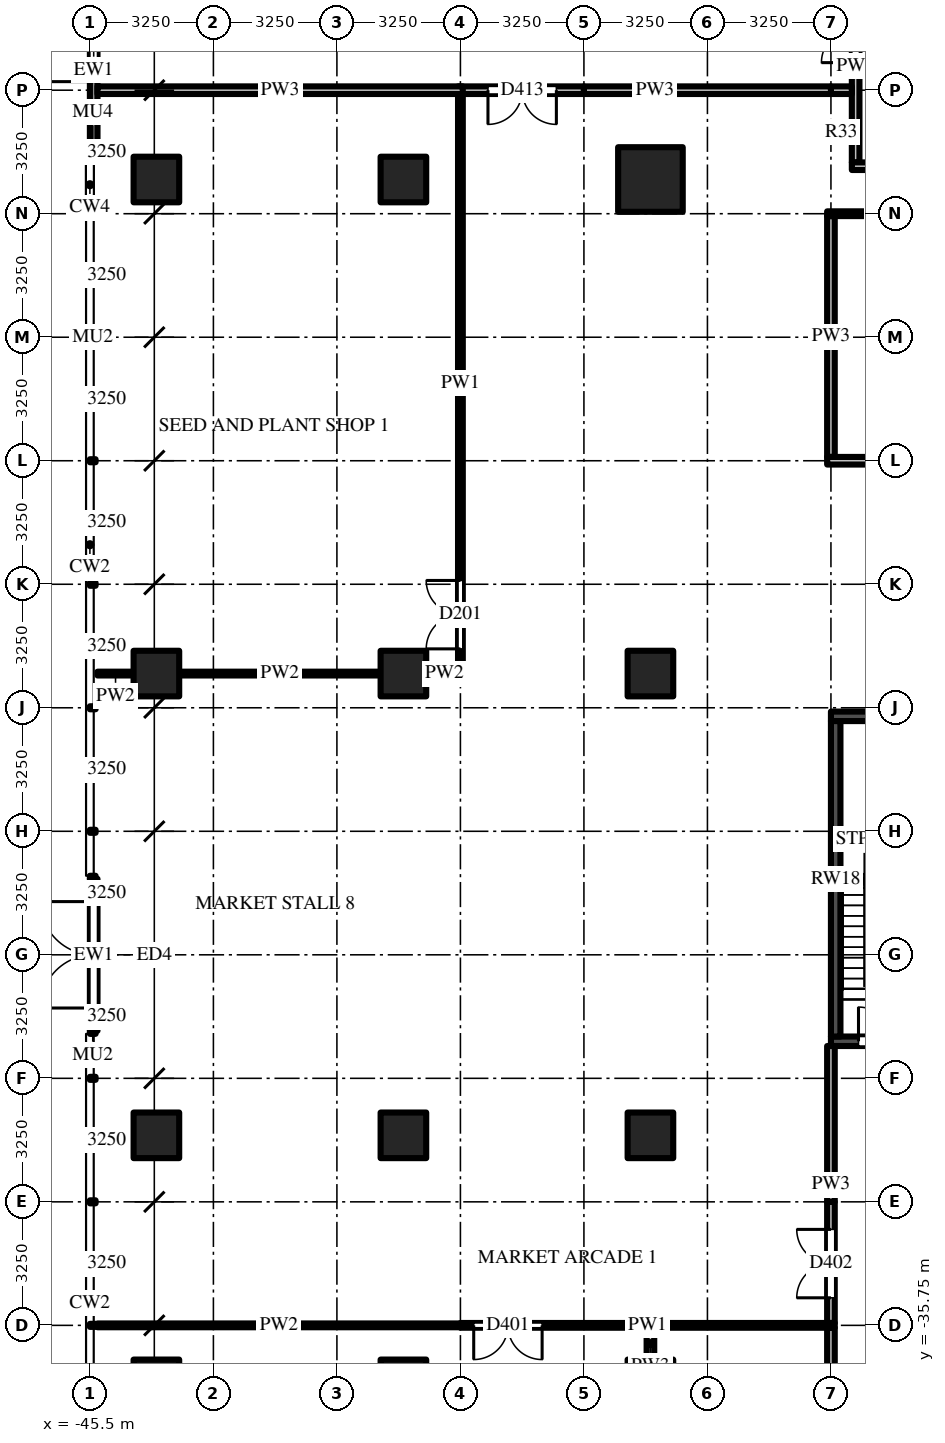
"""IFC4 building model, lengths in metres.
Left out: names, types, materials, properties, quantities, classifications, styles, units other than length and angle.
Written with IfcOpenShell. Run it as: python <this file> out.ifc"""

import sys

from ifc_helpers import new_model, si_unit, direction, frame, frame_2d, origin, origin_2d, place, context, subcontext, project, spatial, rectangle, extrude, source, transform, mapped, element, fill, save


model = new_model("IFC4")
c1 = context("Model", 3, precision=1e-05, world=origin(), true_north=direction((0.0, 1.0)))
c2 = subcontext(c1, "Body", "Model", "MODEL_VIEW")
j1 = project(units=[si_unit("LENGTHUNIT", "METRE"), si_unit("PLANEANGLEUNIT", "RADIAN")], contexts=[c1])
p1 = place(None, origin())
s1 = spatial("IfcSite", under=j1, at=p1, CompositionType="ELEMENT")
p2 = place(p1, origin())
s2 = spatial("IfcBuilding", under=s1, at=p2, CompositionType="ELEMENT")
p3 = place(p2, origin())
s3 = spatial("IfcBuildingStorey", under=s2, at=p3, CompositionType="ELEMENT", Elevation=0.0)
m1 = source(origin(), c2, "Body", "SweptSolid", [
    extrude(rectangle(XDim=1.7, YDim=1.7, at=origin_2d()), origin(), (0.0, 0.0, 1.0), 8.5),
])
p4 = place(p3, frame((-30.75, -5.6, -0.5), z_axis=(0.0, 0.0, 1.0), x_axis=(1.0, 0.0, 0.0)))
e1 = element("IfcColumn", 1, at=p4, inside=s3, PredefinedType="COLUMN", context=c2, shape_type="MappedRepresentation", body=[
    mapped(m1, transform((0.0, 0.0, 0.0))),
])
m2 = source(origin(), c2, "Body", "SweptSolid", [
    extrude(rectangle(XDim=1.2, YDim=1.2, at=origin_2d()), origin(), (0.0, 0.0, 1.0), 8.5),
])
for number, where, z_axis, x_axis in (
    (2, (-30.75, -18.6, -0.5), (0.0, 0.0, 1.0), (1.0, 0.0, 0.0)),
    (3, (-30.75, -30.75, -0.5), (0.0, 0.0, 1.0), (1.0, 0.0, 0.0)),
    (4, (-30.75, -37.25, -0.5), (0.0, 0.0, 1.0), (1.0, 0.0, 0.0)),
    (5, (-37.25, -5.6, -0.5), (0.0, 0.0, 1.0), (1.0, 0.0, 0.0)),
    (6, (-37.25, -18.6, -0.5), (0.0, 0.0, 1.0), (1.0, 0.0, 0.0)),
    (7, (-37.25, -30.75, -0.5), (0.0, 0.0, 1.0), (1.0, 0.0, 0.0)),
    (8, (-37.25, -37.25, -0.5), (0.0, 0.0, 1.0), (1.0, 0.0, 0.0)),
    (9, (-43.75, -5.6, -0.5), (0.0, 0.0, 1.0), (1.0, 0.0, 0.0)),
    (10, (-43.75, -18.6, -0.5), (0.0, 0.0, 1.0), (1.0, 0.0, 0.0)),
    (11, (-43.75, -30.75, -0.5), (0.0, 0.0, 1.0), (1.0, 0.0, 0.0)),
    (12, (-43.75, -37.25, -0.5), (0.0, 0.0, 1.0), (1.0, 0.0, 0.0)),
):
    element("IfcColumn", number, at=place(p3, frame(where, z_axis=z_axis, x_axis=x_axis)), inside=s3, PredefinedType="COLUMN", context=c2, shape_type="MappedRepresentation", body=[
        mapped(m2, transform((0.0, 0.0, 0.0))),
    ])
m3 = source(origin(), c2, "Body", "SweptSolid", [
    extrude(rectangle(XDim=6.5, YDim=0.25, at=frame_2d((3.25, 0.0))), origin(), (0.0, 0.0, 1.0), 7.7),
])
p5 = place(p3, frame((-26.0, -28.275, 0.0), z_axis=(0.0, 0.0, 1.0), x_axis=(1.0, 0.0, 0.0)))
e13 = element("IfcWall", 13, at=p5, inside=s3, PredefinedType="SHEAR", context=c2, shape_type="MappedRepresentation", body=[
    mapped(m3, transform((0.0, 0.0, 0.0))),
])
m4 = source(origin(), c2, "Body", "SweptSolid", [
    extrude(rectangle(XDim=1.8, YDim=2.1, at=frame_2d((0.9, 1.05))), frame((0.0, 0.135, 0.0), z_axis=(0.0, -1.0, 0.0), x_axis=(1.0, 0.0, 0.0)), (0.0, 0.0, 1.0), 0.27),
])
p6 = place(p5, frame((0.725, 0.0, 0.0)))
e14 = element("IfcOpeningElement", 14, at=p6, cuts=e13, PredefinedType="OPENING", context=c2, shape_type="MappedRepresentation", body=[
    mapped(m4, transform((0.0, 0.0, 0.0))),
])
p7 = place(p5, frame((3.975, 0.0, 0.0)))
e15 = element("IfcOpeningElement", 15, at=p7, cuts=e13, PredefinedType="OPENING", context=c2, shape_type="MappedRepresentation", body=[
    mapped(m4, transform((0.0, 0.0, 0.0))),
])
p8 = place(p3, frame((-26.0, -19.725, 0.0), z_axis=(0.0, 0.0, 1.0), x_axis=(1.0, 0.0, 0.0)))
e16 = element("IfcWall", 16, at=p8, inside=s3, PredefinedType="SHEAR", context=c2, shape_type="MappedRepresentation", body=[
    mapped(m3, transform((0.0, 0.0, 0.0))),
])
m5 = source(origin(), c2, "Body", "SweptSolid", [
    extrude(rectangle(XDim=8.3, YDim=0.25, at=frame_2d((4.15, 0.0))), origin(), (0.0, 0.0, 1.0), 7.7),
])
p9 = place(p3, frame((-25.875, -28.15, 0.0), z_axis=(0.0, 0.0, 1.0), x_axis=(0.0, 1.0, 0.0)))
e17 = element("IfcWall", 17, at=p9, inside=s3, PredefinedType="SHEAR", context=c2, shape_type="MappedRepresentation", body=[
    mapped(m5, transform((0.0, 0.0, 0.0))),
])
m6 = source(origin(), c2, "Body", "SweptSolid", [
    extrude(rectangle(XDim=6.5, YDim=0.2, at=frame_2d((3.25, 0.0))), origin(), (0.0, 0.0, 1.0), 7.7),
])
p10 = place(p3, frame((-45.4, -4.875, 0.0), z_axis=(0.0, 0.0, 1.0), x_axis=(0.0, 1.0, 0.0)))
e18 = element("IfcWall", 18, at=p10, inside=s3, PredefinedType="SOLIDWALL", context=c2, shape_type="MappedRepresentation", body=[
    mapped(m6, transform((0.0, 0.0, 0.0))),
])
m7 = source(origin(), c2, "Body", "SweptSolid", [
    extrude(rectangle(XDim=2.8, YDim=2.6, at=frame_2d((1.4, 1.3))), frame((0.0, 0.11, 0.0), z_axis=(0.0, -1.0, 0.0), x_axis=(1.0, 0.0, 0.0)), (0.0, 0.0, 1.0), 0.22),
])
p11 = place(p10, frame((1.85, 0.0, 0.0)))
e19 = element("IfcOpeningElement", 19, at=p11, cuts=e18, PredefinedType="OPENING", context=c2, shape_type="MappedRepresentation", body=[
    mapped(m7, transform((0.0, 0.0, 0.0))),
])
m8 = source(origin(), c2, "Body", "SweptSolid", [
    extrude(rectangle(XDim=4.0, YDim=0.2, at=frame_2d((2.0, 0.0))), origin(), (0.0, 0.0, 1.0), 7.7),
])
p12 = place(p3, frame((-45.4, -28.0, 0.0), z_axis=(0.0, 0.0, 1.0), x_axis=(0.0, 1.0, 0.0)))
e20 = element("IfcWall", 20, at=p12, inside=s3, PredefinedType="SOLIDWALL", context=c2, shape_type="MappedRepresentation", body=[
    mapped(m8, transform((0.0, 0.0, 0.0))),
])
m9 = source(origin(), c2, "Body", "SweptSolid", [
    extrude(rectangle(XDim=2.8, YDim=2.4, at=frame_2d((1.4, 1.2))), frame((0.0, 0.11, 0.0), z_axis=(0.0, -1.0, 0.0), x_axis=(1.0, 0.0, 0.0)), (0.0, 0.0, 1.0), 0.22),
])
p13 = place(p12, frame((0.6, 0.0, 0.0)))
e21 = element("IfcOpeningElement", 21, at=p13, cuts=e20, PredefinedType="OPENING", context=c2, shape_type="MappedRepresentation", body=[
    mapped(m9, transform((0.0, 0.0, 0.0))),
])
p14 = place(p3, frame((-35.75, -18.55, 0.0), z_axis=(0.0, 0.0, 1.0), x_axis=(0.0, 1.0, 0.0)))
e22 = element("IfcWall", 22, at=p14, inside=s3, PredefinedType="PARTITIONING", context=c2, shape_type="SweptSolid", body=[
    extrude(rectangle(XDim=15.2, YDim=0.125, at=frame_2d((7.6, 0.0))), origin(), (0.0, 0.0, 1.0), 6.997),
])
m10 = source(origin(), c2, "Body", "SweptSolid", [
    extrude(rectangle(XDim=1.8, YDim=2.1, at=frame_2d((0.9, 1.05))), frame((0.0, 0.073, 0.0), z_axis=(0.0, -1.0, 0.0), x_axis=(1.0, 0.0, 0.0)), (0.0, 0.0, 1.0), 0.145),
])
p15 = place(p14, frame((0.6, 0.0, 0.0)))
e23 = element("IfcOpeningElement", 23, at=p15, cuts=e22, PredefinedType="OPENING", context=c2, shape_type="MappedRepresentation", body=[
    mapped(m10, transform((0.0, 0.0, 0.0))),
])
p16 = place(p3, frame((-30.75, -36.65, 0.0), z_axis=(0.0, 0.0, 1.0), x_axis=(0.0, 1.0, 0.0)))
e24 = element("IfcWall", 24, at=p16, inside=s3, PredefinedType="PARTITIONING", context=c2, shape_type="SweptSolid", body=[
    extrude(rectangle(XDim=0.837, YDim=0.2, at=frame_2d((0.419, 0.0))), origin(), (0.0, 0.0, 1.0), 6.997),
])
m11 = source(origin(), c2, "Body", "SweptSolid", [
    extrude(rectangle(XDim=3.188, YDim=0.2, at=frame_2d((1.594, 0.0))), origin(), (0.0, 0.0, 1.0), 6.997),
])
p17 = place(p3, frame((-26.0, -35.688, 0.0), z_axis=(0.0, 0.0, 1.0), x_axis=(0.0, 1.0, 0.0)))
e25 = element("IfcWall", 25, at=p17, inside=s3, PredefinedType="PARTITIONING", context=c2, shape_type="MappedRepresentation", body=[
    mapped(m11, transform((0.0, 0.0, 0.0))),
])
m12 = source(origin(), c2, "Body", "SweptSolid", [
    extrude(rectangle(XDim=1.8, YDim=2.1, at=frame_2d((0.9, 1.05))), frame((0.0, 0.11, 0.0), z_axis=(0.0, -1.0, 0.0), x_axis=(1.0, 0.0, 0.0)), (0.0, 0.0, 1.0), 0.22),
])
p18 = place(p17, frame((0.663, 0.0, 0.0)))
e26 = element("IfcOpeningElement", 26, at=p18, cuts=e25, PredefinedType="OPENING", context=c2, shape_type="MappedRepresentation", body=[
    mapped(m12, transform((0.0, 0.0, 0.0))),
])
p19 = place(p3, frame((-26.0, -12.9, 0.0), z_axis=(0.0, 0.0, 1.0), x_axis=(0.0, 1.0, 0.0)))
e27 = element("IfcWall", 27, at=p19, inside=s3, PredefinedType="PARTITIONING", context=c2, shape_type="SweptSolid", body=[
    extrude(rectangle(XDim=6.337, YDim=0.2, at=frame_2d((3.169, 0.0))), origin(), (0.0, 0.0, 1.0), 7.7),
])
m13 = source(origin(), c2, "Body", "SweptSolid", [
    extrude(rectangle(XDim=4.1, YDim=0.2, at=frame_2d((2.05, 0.0))), origin(), (0.0, 0.0, 1.0), 6.839),
])
p20 = place(p3, frame((-26.0, -28.4, 0.0), z_axis=(0.0, 0.0, 1.0), x_axis=(0.0, -1.0, 0.0)))
e28 = element("IfcWall", 28, at=p20, inside=s3, PredefinedType="PARTITIONING", context=c2, shape_type="MappedRepresentation", body=[
    mapped(m13, transform((0.0, 0.0, 0.0))),
])
m14 = source(origin(), c2, "Body", "SweptSolid", [
    extrude(rectangle(XDim=9.488, YDim=0.2, at=frame_2d((4.744, 0.0))), origin(), (0.0, 0.0, 1.0), 6.839),
])
p21 = place(p3, frame((-26.0, -45.3, 0.0), z_axis=(0.0, 0.0, 1.0), x_axis=(0.0, 1.0, 0.0)))
e29 = element("IfcWall", 29, at=p21, inside=s3, PredefinedType="PARTITIONING", context=c2, shape_type="MappedRepresentation", body=[
    mapped(m14, transform((0.0, 0.0, 0.0))),
])
m15 = source(origin(), c2, "Body", "SweptSolid", [
    extrude(rectangle(XDim=1.0, YDim=2.1, at=frame_2d((0.5, 1.05))), frame((0.0, 0.11, 0.0), z_axis=(0.0, -1.0, 0.0), x_axis=(1.0, 0.0, 0.0)), (0.0, 0.0, 1.0), 0.22),
])
p22 = place(p21, frame((0.15, 0.0, 0.0)))
e30 = element("IfcOpeningElement", 30, at=p22, cuts=e29, PredefinedType="OPENING", context=c2, shape_type="MappedRepresentation", body=[
    mapped(m15, transform((0.0, 0.0, 0.0))),
])
m16 = source(origin(), c2, "Body", "SweptSolid", [
    extrude(rectangle(XDim=5.05, YDim=0.2, at=frame_2d((2.525, 0.0))), origin(), (0.0, 0.0, 1.0), 7.077),
])
p23 = place(p3, frame((-25.35, -5.15, 0.0), z_axis=(0.0, 0.0, 1.0), x_axis=(0.0, 1.0, 0.0)))
e31 = element("IfcWall", 31, at=p23, inside=s3, PredefinedType="PARTITIONING", context=c2, shape_type="MappedRepresentation", body=[
    mapped(m16, transform((0.0, 0.0, 0.0))),
])
p24 = place(p23, frame((2.625, 0.0, 0.0)))
e32 = element("IfcOpeningElement", 32, at=p24, cuts=e31, PredefinedType="OPENING", context=c2, shape_type="MappedRepresentation", body=[
    mapped(m12, transform((0.0, 0.0, 0.0))),
])
p25 = place(p3, frame((-45.3, -35.75, 0.0), z_axis=(0.0, 0.0, 1.0), x_axis=(1.0, 0.0, 0.0)))
e33 = element("IfcWall", 33, at=p25, inside=s3, PredefinedType="PARTITIONING", context=c2, shape_type="SweptSolid", body=[
    extrude(rectangle(XDim=9.55, YDim=0.1, at=frame_2d((4.775, 0.0))), origin(), (0.0, 0.0, 1.0), 6.997),
])
m17 = source(origin(), c2, "Body", "SweptSolid", [
    extrude(rectangle(XDim=9.85, YDim=0.125, at=frame_2d((4.925, 0.0))), origin(), (0.0, 0.0, 1.0), 6.997),
])
p26 = place(p3, frame((-25.9, -35.75, 0.0), z_axis=(0.0, 0.0, 1.0), x_axis=(-1.0, 0.0, 0.0)))
e34 = element("IfcWall", 34, at=p26, inside=s3, PredefinedType="PARTITIONING", context=c2, shape_type="MappedRepresentation", body=[
    mapped(m17, transform((0.0, 0.0, 0.0))),
])
p27 = place(p26, frame((7.7, 0.0, 0.0)))
e35 = element("IfcOpeningElement", 35, at=p27, cuts=e34, PredefinedType="OPENING", context=c2, shape_type="MappedRepresentation", body=[
    mapped(m10, transform((0.0, 0.0, 0.0))),
])
m18 = source(origin(), c2, "Body", "SweptSolid", [
    extrude(rectangle(XDim=0.95, YDim=0.1, at=frame_2d((0.475, 0.0))), origin(), (0.0, 0.0, 1.0), 7.7),
])
p28 = place(p3, frame((-45.3, -18.6, 0.0), z_axis=(0.0, 0.0, 1.0), x_axis=(1.0, 0.0, 0.0)))
e36 = element("IfcWall", 36, at=p28, inside=s3, PredefinedType="PARTITIONING", context=c2, shape_type="MappedRepresentation", body=[
    mapped(m18, transform((0.0, 0.0, 0.0))),
])
m19 = source(origin(), c2, "Body", "SweptSolid", [
    extrude(rectangle(XDim=5.3, YDim=0.1, at=frame_2d((2.65, 0.0))), origin(), (0.0, 0.0, 1.0), 6.997),
])
p29 = place(p3, frame((-43.15, -18.6, 0.0), z_axis=(0.0, 0.0, 1.0), x_axis=(1.0, 0.0, 0.0)))
e37 = element("IfcWall", 37, at=p29, inside=s3, PredefinedType="PARTITIONING", context=c2, shape_type="MappedRepresentation", body=[
    mapped(m19, transform((0.0, 0.0, 0.0))),
])
m20 = source(origin(), c2, "Body", "SweptSolid", [
    extrude(rectangle(XDim=0.962, YDim=0.1, at=frame_2d((0.481, 0.0))), origin(), (0.0, 0.0, 1.0), 6.997),
])
p30 = place(p3, frame((-36.65, -18.6, 0.0), z_axis=(0.0, 0.0, 1.0), x_axis=(1.0, 0.0, 0.0)))
e38 = element("IfcWall", 38, at=p30, inside=s3, PredefinedType="PARTITIONING", context=c2, shape_type="MappedRepresentation", body=[
    mapped(m20, transform((0.0, 0.0, 0.0))),
])
p31 = place(p3, frame((-26.1, -13.0, 0.0), z_axis=(0.0, 0.0, 1.0), x_axis=(1.0, 0.0, 0.0)))
e39 = element("IfcWall", 39, at=p31, inside=s3, PredefinedType="PARTITIONING", context=c2, shape_type="SweptSolid", body=[
    extrude(rectangle(XDim=6.663, YDim=0.2, at=frame_2d((3.331, 0.0))), origin(), (0.0, 0.0, 1.0), 6.997),
])
p32 = place(p3, frame((-22.95, -6.5, 0.0), z_axis=(0.0, 0.0, 1.0), x_axis=(-1.0, 0.0, 0.0)))
e40 = element("IfcWall", 40, at=p32, inside=s3, PredefinedType="PARTITIONING", context=c2, shape_type="SweptSolid", body=[
    extrude(rectangle(XDim=3.15, YDim=0.125, at=frame_2d((1.575, 0.0))), origin(), (0.0, 0.0, 1.0), 6.997),
])
m21 = source(origin(), c2, "Body", "SweptSolid", [
    extrude(rectangle(XDim=2.5, YDim=0.2, at=frame_2d((1.25, 0.0))), origin(), (0.0, 0.0, 1.0), 7.7),
])
p33 = place(p3, frame((-25.45, -5.25, 0.0), z_axis=(0.0, 0.0, 1.0), x_axis=(1.0, 0.0, 0.0)))
e41 = element("IfcWall", 41, at=p33, inside=s3, PredefinedType="PARTITIONING", context=c2, shape_type="MappedRepresentation", body=[
    mapped(m21, transform((0.0, 0.0, 0.0))),
])
p34 = place(p33, frame((0.4, 0.0, 0.0)))
e42 = element("IfcOpeningElement", 42, at=p34, cuts=e41, PredefinedType="OPENING", context=c2, shape_type="MappedRepresentation", body=[
    mapped(m12, transform((0.0, 0.0, 0.0))),
])
m22 = source(origin(), c2, "Body", "SweptSolid", [
    extrude(rectangle(XDim=3.312, YDim=0.2, at=frame_2d((1.656, 0.0))), origin(), (0.0, 0.0, 1.0), 6.997),
])
p35 = place(p3, frame((-32.5, -3.25, 0.0), z_axis=(0.0, 0.0, 1.0), x_axis=(-1.0, 0.0, 0.0)))
e43 = element("IfcWall", 43, at=p35, inside=s3, PredefinedType="PARTITIONING", context=c2, shape_type="MappedRepresentation", body=[
    mapped(m22, transform((0.0, 0.0, 0.0))),
])
p36 = place(p35, frame((0.725, 0.0, 0.0)))
e44 = element("IfcOpeningElement", 44, at=p36, cuts=e43, PredefinedType="OPENING", context=c2, shape_type="MappedRepresentation", body=[
    mapped(m12, transform((0.0, 0.0, 0.0))),
])
m23 = source(origin(), c2, "Body", "SweptSolid", [
    extrude(rectangle(XDim=0.55, YDim=0.2, at=frame_2d((0.275, 0.0))), origin(), (0.0, 0.0, 1.0), 7.7),
])
p37 = place(p3, frame((-26.0, -3.25, 0.0), z_axis=(0.0, 0.0, 1.0), x_axis=(1.0, 0.0, 0.0)))
e45 = element("IfcWall", 45, at=p37, inside=s3, PredefinedType="PARTITIONING", context=c2, shape_type="MappedRepresentation", body=[
    mapped(m23, transform((0.0, 0.0, 0.0))),
])
m24 = source(origin(), c2, "Body", "SweptSolid", [
    extrude(rectangle(XDim=9.613, YDim=0.2, at=frame_2d((4.806, 0.0))), origin(), (0.0, 0.0, 1.0), 6.918),
])
p38 = place(p3, frame((-35.688, -3.25, 0.0), z_axis=(0.0, 0.0, 1.0), x_axis=(-1.0, 0.0, 0.0)))
e46 = element("IfcWall", 46, at=p38, inside=s3, PredefinedType="PARTITIONING", context=c2, shape_type="MappedRepresentation", body=[
    mapped(m24, transform((0.0, 0.0, 0.0))),
])
m25 = source(origin(), c2, "Body", "SweptSolid", [
    extrude(rectangle(XDim=6.5, YDim=0.2, at=frame_2d((3.25, 0.0))), origin(), (0.0, 0.0, 1.0), 6.918),
])
p39 = place(p3, frame((-26.0, -3.25, 0.0), z_axis=(0.0, 0.0, 1.0), x_axis=(-1.0, 0.0, 0.0)))
e47 = element("IfcWall", 47, at=p39, inside=s3, PredefinedType="PARTITIONING", context=c2, shape_type="MappedRepresentation", body=[
    mapped(m25, transform((0.0, 0.0, 0.0))),
])
m26 = source(origin(), c2, "Body", "SweptSolid", [
    extrude(rectangle(XDim=1.8, YDim=2.1, at=frame_2d((0.9, 1.05))), frame((0.0, 0.025, 0.0), z_axis=(0.0, -1.0, 0.0), x_axis=(1.0, 0.0, 0.0)), (0.0, 0.0, 1.0), 0.05),
])
p40 = place(p6, origin())
e48 = element("IfcDoor", 48, at=p40, inside=s3, OperationType="DOUBLE_DOOR_SINGLE_SWING", PredefinedType="DOOR", context=c2, shape_type="MappedRepresentation", body=[
    mapped(m26, transform((0.0, 0.0, 0.0))),
])
fill(e14, e48)
m27 = source(origin(), c2, "Body", "SweptSolid", [
    extrude(rectangle(XDim=2.8, YDim=2.6, at=frame_2d((1.4, 1.3))), frame((0.0, 0.025, 0.0), z_axis=(0.0, -1.0, 0.0), x_axis=(1.0, 0.0, 0.0)), (0.0, 0.0, 1.0), 0.05),
])
p41 = place(p11, origin())
e49 = element("IfcDoor", 49, at=p41, inside=s3, OperationType="DOUBLE_DOOR_SINGLE_SWING", PredefinedType="DOOR", context=c2, shape_type="MappedRepresentation", body=[
    mapped(m27, transform((0.0, 0.0, 0.0))),
])
fill(e19, e49)
m28 = source(origin(), c2, "Body", "SweptSolid", [
    extrude(rectangle(XDim=2.8, YDim=2.4, at=frame_2d((1.4, 1.2))), frame((0.0, 0.025, 0.0), z_axis=(0.0, -1.0, 0.0), x_axis=(1.0, 0.0, 0.0)), (0.0, 0.0, 1.0), 0.05),
])
p42 = place(p13, origin())
e50 = element("IfcDoor", 50, at=p42, inside=s3, OperationType="DOUBLE_DOOR_SINGLE_SWING", PredefinedType="DOOR", context=c2, shape_type="MappedRepresentation", body=[
    mapped(m28, transform((0.0, 0.0, 0.0))),
])
fill(e21, e50)
p43 = place(p27, origin())
e51 = element("IfcDoor", 51, at=p43, inside=s3, OperationType="DOUBLE_DOOR_SINGLE_SWING", PredefinedType="DOOR", context=c2, shape_type="MappedRepresentation", body=[
    mapped(m26, transform((0.0, 0.0, 0.0))),
])
fill(e35, e51)
p44 = place(p18, origin())
e52 = element("IfcDoor", 52, at=p44, inside=s3, OperationType="DOUBLE_DOOR_SINGLE_SWING", PredefinedType="DOOR", context=c2, shape_type="MappedRepresentation", body=[
    mapped(m26, transform((0.0, 0.0, 0.0))),
])
fill(e26, e52)
p45 = place(p15, origin())
e53 = element("IfcDoor", 53, at=p45, inside=s3, OperationType="DOUBLE_DOOR_SINGLE_SWING", PredefinedType="DOOR", context=c2, shape_type="MappedRepresentation", body=[
    mapped(m26, transform((0.0, 0.0, 0.0))),
])
fill(e23, e53)
p46 = place(p36, origin())
e54 = element("IfcDoor", 54, at=p46, inside=s3, OperationType="DOUBLE_DOOR_SINGLE_SWING", PredefinedType="DOOR", context=c2, shape_type="MappedRepresentation", body=[
    mapped(m26, transform((0.0, 0.0, 0.0))),
])
fill(e44, e54)
p47 = place(p24, origin())
e55 = element("IfcDoor", 55, at=p47, inside=s3, OperationType="DOUBLE_DOOR_SINGLE_SWING", PredefinedType="DOOR", context=c2, shape_type="MappedRepresentation", body=[
    mapped(m26, transform((0.0, 0.0, 0.0))),
])
fill(e32, e55)
save(model, sys.argv[1])
